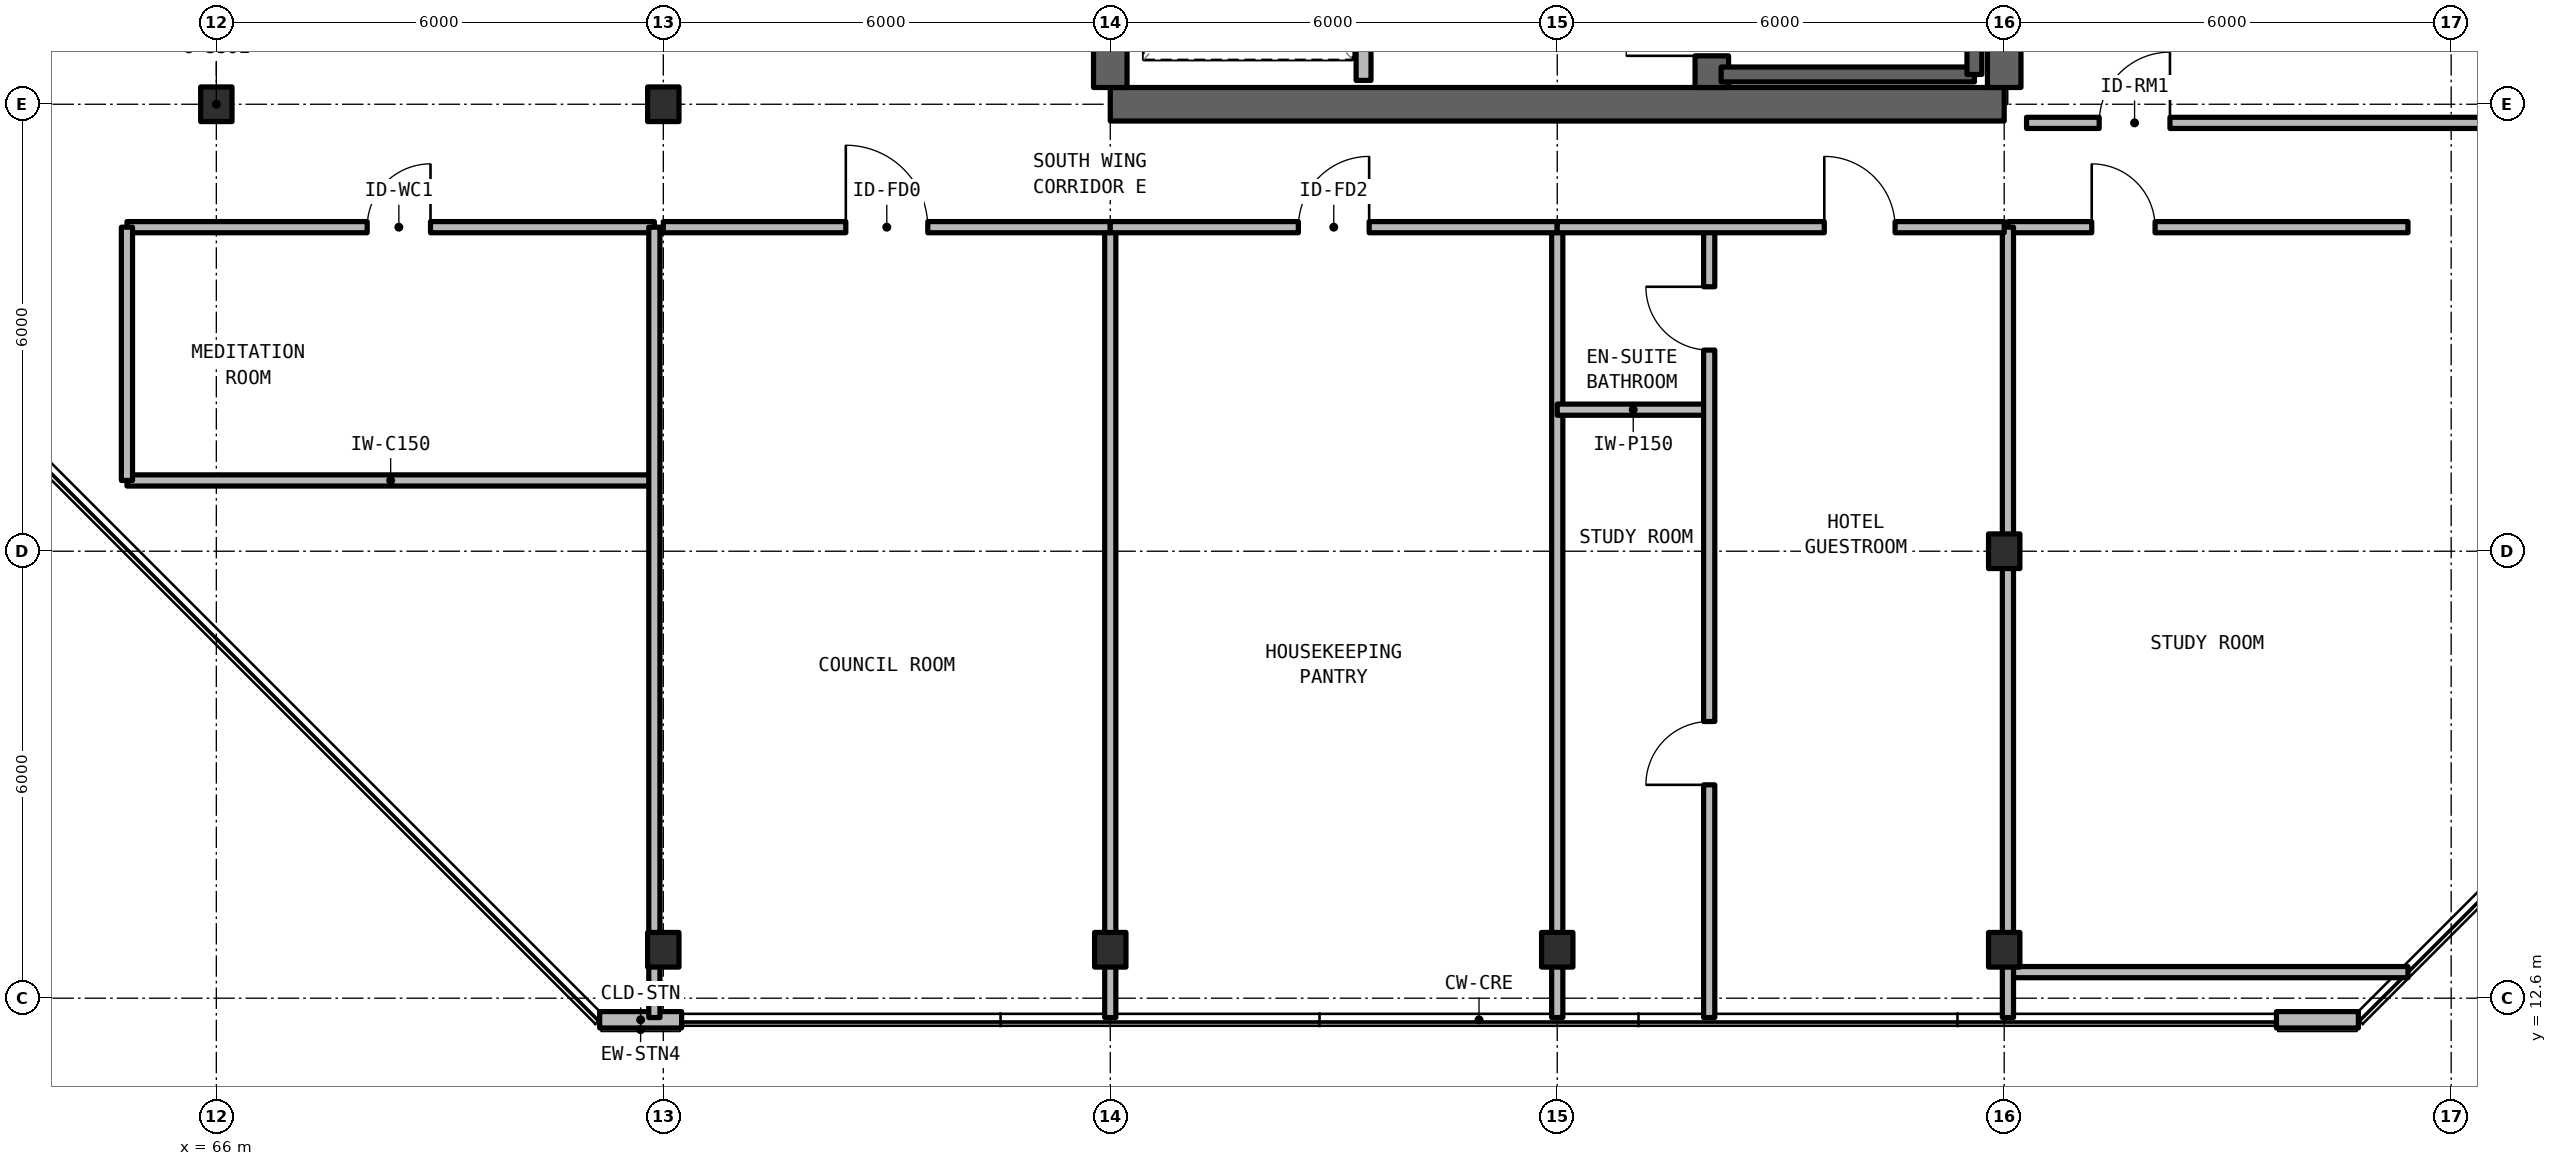
"""IFC4 building model, lengths in metres.
Left out: names, types, materials, properties, quantities, classifications, styles, units other than length and angle.
Written with IfcOpenShell. Run it as: python <this file> out.ifc"""

import sys

from ifc_helpers import new_model, si_unit, direction, frame, frame_2d, origin, origin_2d, place, context, subcontext, project, spatial, rectangle, i_section, extrude, element, fill, save


model = new_model("IFC4")
c1 = context("Model", 3, precision=1e-05, world=origin(), true_north=direction((0.0, 1.0)))
c2 = subcontext(c1, "Body", "Model", "MODEL_VIEW")
j1 = project(units=[si_unit("LENGTHUNIT", "METRE"), si_unit("PLANEANGLEUNIT", "RADIAN")], contexts=[c1])
p1 = place(None, origin())
s1 = spatial("IfcSite", under=j1, at=p1, CompositionType="ELEMENT")
p2 = place(p1, origin())
s2 = spatial("IfcBuilding", under=s1, at=p2, CompositionType="ELEMENT")
p3 = place(p2, frame((0.0, 0.0, 267.96)))
s3 = spatial("IfcBuildingStorey", under=s2, at=p3, CompositionType="ELEMENT", Elevation=267.96)
p4 = place(p3, frame((78.0, 24.6, 0.0), z_axis=(0.0, 0.0, 1.0), x_axis=(1.0, 0.0, 0.0)))
e1 = element("IfcWall", 1, at=p4, inside=s3, PredefinedType="SHEAR", context=c2, shape_type="SweptSolid", body=[
    extrude(rectangle(XDim=12.0, YDim=0.45, at=frame_2d((6.0, 0.0))), origin(), (0.0, 0.0, 1.0), 3.63),
])
p5 = place(p3, frame((90.0, 24.825, 0.0), z_axis=(0.0, 0.0, 1.0), x_axis=(0.0, 1.0, 0.0)))
e2 = element("IfcWall", 2, at=p5, inside=s3, PredefinedType="SHEAR", context=c2, shape_type="SweptSolid", body=[
    extrude(rectangle(XDim=17.55, YDim=0.45, at=frame_2d((8.775, 0.0))), origin(), (0.0, 0.0, 1.0), 3.63),
])
p6 = place(p3, frame((78.0, 24.825, 0.0), z_axis=(0.0, 0.0, 1.0), x_axis=(0.0, 1.0, 0.0)))
e3 = element("IfcWall", 3, at=p6, inside=s3, PredefinedType="SHEAR", context=c2, shape_type="SweptSolid", body=[
    extrude(rectangle(XDim=8.975, YDim=0.45, at=frame_2d((4.488, 0.0))), origin(), (0.0, 0.0, 1.0), 3.63),
])
p7 = place(p3, frame((86.075, 24.825, 0.0), z_axis=(0.0, 0.0, 1.0), x_axis=(0.0, 1.0, 0.0)))
e4 = element("IfcWall", 4, at=p7, inside=s3, PredefinedType="SHEAR", context=c2, shape_type="SweptSolid", body=[
    extrude(rectangle(XDim=17.55, YDim=0.45, at=frame_2d((8.775, 0.0))), origin(), (0.0, 0.0, 1.0), 3.63),
])
p8 = place(p7, frame((0.425, 0.0, 0.0)))
e5 = element("IfcOpeningElement", 5, at=p8, cuts=e4, PredefinedType="OPENING", context=c2, shape_type="SweptSolid", body=[
    extrude(rectangle(XDim=1.15, YDim=2.15, at=frame_2d((0.575, 1.075))), frame((0.0, 0.235, 0.0), z_axis=(0.0, -1.0, 0.0), x_axis=(1.0, 0.0, 0.0)), (0.0, 0.0, 1.0), 0.47),
])
p9 = place(p7, frame((9.625, 0.0, 0.0)))
e6 = element("IfcOpeningElement", 6, at=p9, cuts=e4, PredefinedType="OPENING", context=c2, shape_type="SweptSolid", body=[
    extrude(rectangle(XDim=1.15, YDim=2.15, at=frame_2d((0.575, 1.075))), frame((0.0, 0.235, 0.0), z_axis=(0.0, -1.0, 0.0), x_axis=(1.0, 0.0, 0.0)), (0.0, 0.0, 1.0), 0.47),
])
for number, where, z_axis, x_axis in (
    (7, (66.0, 24.6, 0.0), (0.0, 0.0, 1.0), (1.0, 0.0, 0.0)),
    (8, (72.0, 24.6, 0.0), (0.0, 0.0, 1.0), (1.0, 0.0, 0.0)),
    (9, (90.0, 18.6, 0.0), (0.0, 0.0, 1.0), (1.0, 0.0, 0.0)),
    (10, (72.0, 13.25, 0.0), (0.0, 0.0, 1.0), (1.0, 0.0, 0.0)),
    (11, (78.0, 13.25, 0.0), (0.0, 0.0, 1.0), (1.0, 0.0, 0.0)),
    (12, (84.0, 13.25, 0.0), (0.0, 0.0, 1.0), (1.0, 0.0, 0.0)),
    (13, (90.0, 13.25, 0.0), (0.0, 0.0, 1.0), (1.0, 0.0, 0.0)),
):
    element("IfcColumn", number, at=place(p3, frame(where, z_axis=z_axis, x_axis=x_axis)), inside=s3, PredefinedType="COLUMN", context=c2, shape_type="SweptSolid", body=[
        extrude(i_section(OverallWidth=0.421, OverallDepth=0.465, WebThickness=0.045, FlangeThickness=0.07, FilletRadius=0.015, at=origin_2d()), origin(), (0.0, 0.0, 1.0), 3.63),
    ])
for number, where, z_axis, x_axis in (
    (14, (71.146, 12.31, 0.0), (0.0, 0.0, 1.0), (1.0, 0.0, 0.0)),
    (15, (93.654, 12.31, 0.0), (0.0, 0.0, 1.0), (1.0, 0.0, 0.0)),
):
    element("IfcWall", number, at=place(p3, frame(where, z_axis=z_axis, x_axis=x_axis)), inside=s3, PredefinedType="SOLIDWALL", context=c2, shape_type="SweptSolid", body=[
        extrude(rectangle(XDim=1.1, YDim=0.22, at=frame_2d((0.55, 0.0))), origin(), (0.0, 0.0, 1.0), 3.41),
    ])
p10 = place(p3, frame((81.4, 24.92, 0.0), z_axis=(0.0, 0.0, 1.0), x_axis=(0.0, 1.0, 0.0)))
e16 = element("IfcWall", 16, at=p10, inside=s3, PredefinedType="SOLIDWALL", context=c2, shape_type="SweptSolid", body=[
    extrude(rectangle(XDim=3.58, YDim=0.2, at=frame_2d((1.79, 0.0))), origin(), (0.0, 0.0, 1.0), 2.63),
])
p11 = place(p10, frame((1.3, 0.0, 0.0)))
e17 = element("IfcOpeningElement", 17, at=p11, cuts=e16, PredefinedType="OPENING", context=c2, shape_type="SweptSolid", body=[
    extrude(rectangle(XDim=1.1, YDim=2.2, at=frame_2d((0.55, 1.1))), frame((0.0, 0.11, 0.0), z_axis=(0.0, -1.0, 0.0), x_axis=(1.0, 0.0, 0.0)), (0.0, 0.0, 1.0), 0.22),
])
p12 = place(p3, frame((64.8, 19.55, 0.0), z_axis=(0.0, 0.0, 1.0), x_axis=(1.0, 0.0, 0.0)))
e18 = element("IfcWall", 18, at=p12, inside=s3, PredefinedType="SOLIDWALL", context=c2, shape_type="SweptSolid", body=[
    extrude(rectangle(XDim=7.08, YDim=0.15, at=frame_2d((3.54, 0.0))), origin(), (0.0, 0.0, 1.0), 2.63),
])
p13 = place(p3, frame((64.8, 22.95, 0.0), z_axis=(0.0, 0.0, 1.0), x_axis=(1.0, 0.0, 0.0)))
e19 = element("IfcWall", 19, at=p13, inside=s3, PredefinedType="SOLIDWALL", context=c2, shape_type="SweptSolid", body=[
    extrude(rectangle(XDim=7.08, YDim=0.15, at=frame_2d((3.54, 0.0))), origin(), (0.0, 0.0, 1.0), 2.63),
])
p14 = place(p13, frame((3.225, 0.0, 0.0)))
e20 = element("IfcOpeningElement", 20, at=p14, cuts=e19, PredefinedType="OPENING", context=c2, shape_type="SweptSolid", body=[
    extrude(rectangle(XDim=0.85, YDim=2.1, at=frame_2d((0.425, 1.05))), frame((0.0, 0.085, 0.0), z_axis=(0.0, -1.0, 0.0), x_axis=(1.0, 0.0, 0.0)), (0.0, 0.0, 1.0), 0.17),
])
p15 = place(p3, frame((64.8, 19.55, 0.0), z_axis=(0.0, 0.0, 1.0), x_axis=(0.0, 1.0, 0.0)))
e21 = element("IfcWall", 21, at=p15, inside=s3, PredefinedType="SOLIDWALL", context=c2, shape_type="SweptSolid", body=[
    extrude(rectangle(XDim=3.4, YDim=0.15, at=frame_2d((1.7, 0.0))), origin(), (0.0, 0.0, 1.0), 2.63),
])
p16 = place(p3, frame((71.88, 12.34, 0.0), z_axis=(0.0, 0.0, 1.0), x_axis=(0.0, 1.0, 0.0)))
e22 = element("IfcWall", 22, at=p16, inside=s3, PredefinedType="SOLIDWALL", context=c2, shape_type="SweptSolid", body=[
    extrude(rectangle(XDim=10.61, YDim=0.15, at=frame_2d((5.305, 0.0))), origin(), (0.0, 0.0, 1.0), 2.63),
])
p17 = place(p3, frame((90.3, 24.35, 0.0), z_axis=(0.0, 0.0, 1.0), x_axis=(1.0, 0.0, 0.0)))
e23 = element("IfcWall", 23, at=p17, inside=s3, PredefinedType="SOLIDWALL", context=c2, shape_type="SweptSolid", body=[
    extrude(rectangle(XDim=8.52, YDim=0.15, at=frame_2d((4.26, 0.0))), origin(), (0.0, 0.0, 1.0), 2.63),
])
p18 = place(p17, frame((0.975, 0.0, 0.0)))
e24 = element("IfcOpeningElement", 24, at=p18, cuts=e23, PredefinedType="OPENING", context=c2, shape_type="SweptSolid", body=[
    extrude(rectangle(XDim=0.95, YDim=2.15, at=frame_2d((0.475, 1.075))), frame((0.0, 0.085, 0.0), z_axis=(0.0, -1.0, 0.0), x_axis=(1.0, 0.0, 0.0)), (0.0, 0.0, 1.0), 0.17),
])
p19 = place(p3, frame((90.05, 12.95, 0.0), z_axis=(0.0, 0.0, 1.0), x_axis=(1.0, 0.0, 0.0)))
e25 = element("IfcWall", 25, at=p19, inside=s3, PredefinedType="SOLIDWALL", context=c2, shape_type="SweptSolid", body=[
    extrude(rectangle(XDim=5.37, YDim=0.15, at=frame_2d((2.685, 0.0))), origin(), (0.0, 0.0, 1.0), 2.63),
])
p20 = place(p3, frame((90.05, 22.95, 0.0), z_axis=(0.0, 0.0, 1.0), x_axis=(1.0, 0.0, 0.0)))
e26 = element("IfcWall", 26, at=p20, inside=s3, PredefinedType="SOLIDWALL", context=c2, shape_type="SweptSolid", body=[
    extrude(rectangle(XDim=5.37, YDim=0.15, at=frame_2d((2.685, 0.0))), origin(), (0.0, 0.0, 1.0), 2.63),
])
p21 = place(p20, frame((1.125, 0.0, 0.0)))
e27 = element("IfcOpeningElement", 27, at=p21, cuts=e26, PredefinedType="OPENING", context=c2, shape_type="SweptSolid", body=[
    extrude(rectangle(XDim=0.85, YDim=2.1, at=frame_2d((0.425, 1.05))), frame((0.0, 0.085, 0.0), z_axis=(0.0, -1.0, 0.0), x_axis=(1.0, 0.0, 0.0)), (0.0, 0.0, 1.0), 0.17),
])
for number, where, z_axis, x_axis in (
    (28, (90.05, 12.34, 0.0), (0.0, 0.0, 1.0), (0.0, 1.0, 0.0)),
    (29, (78.0, 12.34, 0.0), (0.0, 0.0, 1.0), (0.0, 1.0, 0.0)),
):
    element("IfcWall", number, at=place(p3, frame(where, z_axis=z_axis, x_axis=x_axis)), inside=s3, PredefinedType="SOLIDWALL", context=c2, shape_type="SweptSolid", body=[
        extrude(rectangle(XDim=10.61, YDim=0.15, at=frame_2d((5.305, 0.0))), origin(), (0.0, 0.0, 1.0), 2.63),
    ])
p22 = place(p3, frame((72.0, 22.95, 0.0), z_axis=(0.0, 0.0, 1.0), x_axis=(1.0, 0.0, 0.0)))
e30 = element("IfcWall", 30, at=p22, inside=s3, PredefinedType="SOLIDWALL", context=c2, shape_type="SweptSolid", body=[
    extrude(rectangle(XDim=6.0, YDim=0.15, at=frame_2d((3.0, 0.0))), origin(), (0.0, 0.0, 1.0), 2.63),
])
p23 = place(p22, frame((2.45, 0.0, 0.0)))
e31 = element("IfcOpeningElement", 31, at=p23, cuts=e30, PredefinedType="OPENING", context=c2, shape_type="SweptSolid", body=[
    extrude(rectangle(XDim=1.1, YDim=2.15, at=frame_2d((0.55, 1.075))), frame((0.0, 0.085, 0.0), z_axis=(0.0, -1.0, 0.0), x_axis=(1.0, 0.0, 0.0)), (0.0, 0.0, 1.0), 0.17),
])
p24 = place(p3, frame((84.0, 12.34, 0.0), z_axis=(0.0, 0.0, 1.0), x_axis=(0.0, 1.0, 0.0)))
e32 = element("IfcWall", 32, at=p24, inside=s3, PredefinedType="SOLIDWALL", context=c2, shape_type="SweptSolid", body=[
    extrude(rectangle(XDim=10.61, YDim=0.15, at=frame_2d((5.305, 0.0))), origin(), (0.0, 0.0, 1.0), 2.63),
])
p25 = place(p3, frame((78.0, 22.95, 0.0), z_axis=(0.0, 0.0, 1.0), x_axis=(1.0, 0.0, 0.0)))
e33 = element("IfcWall", 33, at=p25, inside=s3, PredefinedType="SOLIDWALL", context=c2, shape_type="SweptSolid", body=[
    extrude(rectangle(XDim=6.0, YDim=0.15, at=frame_2d((3.0, 0.0))), origin(), (0.0, 0.0, 1.0), 2.63),
])
p26 = place(p25, frame((2.525, 0.0, 0.0)))
e34 = element("IfcOpeningElement", 34, at=p26, cuts=e33, PredefinedType="OPENING", context=c2, shape_type="SweptSolid", body=[
    extrude(rectangle(XDim=0.95, YDim=2.15, at=frame_2d((0.475, 1.075))), frame((0.0, 0.085, 0.0), z_axis=(0.0, -1.0, 0.0), x_axis=(1.0, 0.0, 0.0)), (0.0, 0.0, 1.0), 0.17),
])
p27 = place(p3, frame((84.0, 20.5, 0.0), z_axis=(0.0, 0.0, 1.0), x_axis=(1.0, 0.0, 0.0)))
e35 = element("IfcWall", 35, at=p27, inside=s3, PredefinedType="PARTITIONING", context=c2, shape_type="SweptSolid", body=[
    extrude(rectangle(XDim=2.04, YDim=0.15, at=frame_2d((1.02, 0.0))), origin(), (0.0, 0.0, 1.0), 2.63),
])
p28 = place(p3, frame((86.04, 12.34, 0.0), z_axis=(0.0, 0.0, 1.0), x_axis=(0.0, 1.0, 0.0)))
e36 = element("IfcWall", 36, at=p28, inside=s3, PredefinedType="PARTITIONING", context=c2, shape_type="SweptSolid", body=[
    extrude(rectangle(XDim=10.61, YDim=0.15, at=frame_2d((5.305, 0.0))), origin(), (0.0, 0.0, 1.0), 2.63),
])
p29 = place(p28, frame((3.124, 0.0, 0.0)))
e37 = element("IfcOpeningElement", 37, at=p29, cuts=e36, PredefinedType="OPENING", context=c2, shape_type="SweptSolid", body=[
    extrude(rectangle(XDim=0.85, YDim=2.1, at=frame_2d((0.425, 1.05))), frame((0.0, 0.085, 0.0), z_axis=(0.0, -1.0, 0.0), x_axis=(1.0, 0.0, 0.0)), (0.0, 0.0, 1.0), 0.17),
])
p30 = place(p28, frame((8.96, 0.0, 0.0)))
e38 = element("IfcOpeningElement", 38, at=p30, cuts=e36, PredefinedType="OPENING", context=c2, shape_type="SweptSolid", body=[
    extrude(rectangle(XDim=0.85, YDim=2.1, at=frame_2d((0.425, 1.05))), frame((0.0, 0.085, 0.0), z_axis=(0.0, -1.0, 0.0), x_axis=(1.0, 0.0, 0.0)), (0.0, 0.0, 1.0), 0.17),
])
p31 = place(p3, frame((84.0, 22.95, 0.0), z_axis=(0.0, 0.0, 1.0), x_axis=(1.0, 0.0, 0.0)))
e39 = element("IfcWall", 39, at=p31, inside=s3, PredefinedType="SOLIDWALL", context=c2, shape_type="SweptSolid", body=[
    extrude(rectangle(XDim=6.0, YDim=0.15, at=frame_2d((3.0, 0.0))), origin(), (0.0, 0.0, 1.0), 2.63),
])
p32 = place(p31, frame((3.585, 0.0, 0.0)))
e40 = element("IfcOpeningElement", 40, at=p32, cuts=e39, PredefinedType="OPENING", context=c2, shape_type="SweptSolid", body=[
    extrude(rectangle(XDim=0.95, YDim=2.15, at=frame_2d((0.475, 1.075))), frame((0.0, 0.085, 0.0), z_axis=(0.0, -1.0, 0.0), x_axis=(1.0, 0.0, 0.0)), (0.0, 0.0, 1.0), 0.17),
])
p33 = place(p3, frame((86.2, 25.0, 0.0), z_axis=(0.0, 0.0, 1.0), x_axis=(1.0, 0.0, 0.0)))
e41 = element("IfcWall", 41, at=p33, inside=s3, PredefinedType="SOLIDWALL", context=c2, shape_type="SweptSolid", body=[
    extrude(rectangle(XDim=3.4, YDim=0.2, at=frame_2d((1.7, 0.0))), origin(), (0.0, 0.0, 1.0), 3.63),
])
p34 = place(p3, frame((89.6, 25.0, 0.0), z_axis=(0.0, 0.0, 1.0), x_axis=(0.0, 1.0, 0.0)))
e42 = element("IfcWall", 42, at=p34, inside=s3, PredefinedType="SOLIDWALL", context=c2, shape_type="SweptSolid", body=[
    extrude(rectangle(XDim=8.0, YDim=0.2, at=frame_2d((4.0, 0.0))), origin(), (0.0, 0.0, 1.0), 3.63),
])
p35 = place(p14, origin())
e43 = element("IfcDoor", 43, at=p35, inside=s3, OperationType="SINGLE_SWING_RIGHT", PredefinedType="DOOR", context=c2, shape_type="SweptSolid", body=[
    extrude(rectangle(XDim=0.85, YDim=2.1, at=frame_2d((0.425, 1.05))), frame((0.0, 0.025, 0.0), z_axis=(0.0, -1.0, 0.0), x_axis=(1.0, 0.0, 0.0)), (0.0, 0.0, 1.0), 0.05),
])
fill(e20, e43)
p36 = place(p18, origin())
e44 = element("IfcDoor", 44, at=p36, inside=s3, OperationType="SINGLE_SWING_RIGHT", PredefinedType="DOOR", context=c2, shape_type="SweptSolid", body=[
    extrude(rectangle(XDim=0.95, YDim=2.15, at=frame_2d((0.475, 1.075))), frame((0.0, 0.025, 0.0), z_axis=(0.0, -1.0, 0.0), x_axis=(1.0, 0.0, 0.0)), (0.0, 0.0, 1.0), 0.05),
])
fill(e24, e44)
p37 = place(p21, origin())
e45 = element("IfcDoor", 45, at=p37, inside=s3, OperationType="SINGLE_SWING_LEFT", PredefinedType="DOOR", context=c2, shape_type="SweptSolid", body=[
    extrude(rectangle(XDim=0.85, YDim=2.1, at=frame_2d((0.425, 1.05))), frame((0.0, 0.025, 0.0), z_axis=(0.0, -1.0, 0.0), x_axis=(1.0, 0.0, 0.0)), (0.0, 0.0, 1.0), 0.05),
])
fill(e27, e45)
p38 = place(p23, origin())
e46 = element("IfcDoor", 46, at=p38, inside=s3, OperationType="SINGLE_SWING_LEFT", PredefinedType="DOOR", context=c2, shape_type="SweptSolid", body=[
    extrude(rectangle(XDim=1.1, YDim=2.15, at=frame_2d((0.55, 1.075))), frame((0.0, 0.025, 0.0), z_axis=(0.0, -1.0, 0.0), x_axis=(1.0, 0.0, 0.0)), (0.0, 0.0, 1.0), 0.05),
])
fill(e31, e46)
p39 = place(p26, origin())
e47 = element("IfcDoor", 47, at=p39, inside=s3, OperationType="SINGLE_SWING_RIGHT", PredefinedType="DOOR", context=c2, shape_type="SweptSolid", body=[
    extrude(rectangle(XDim=0.95, YDim=2.15, at=frame_2d((0.475, 1.075))), frame((0.0, 0.025, 0.0), z_axis=(0.0, -1.0, 0.0), x_axis=(1.0, 0.0, 0.0)), (0.0, 0.0, 1.0), 0.05),
])
fill(e34, e47)
p40 = place(p29, origin())
e48 = element("IfcDoor", 48, at=p40, inside=s3, OperationType="SINGLE_SWING_LEFT", PredefinedType="DOOR", context=c2, shape_type="SweptSolid", body=[
    extrude(rectangle(XDim=0.85, YDim=2.1, at=frame_2d((0.425, 1.05))), frame((0.0, 0.025, 0.0), z_axis=(0.0, -1.0, 0.0), x_axis=(1.0, 0.0, 0.0)), (0.0, 0.0, 1.0), 0.05),
])
fill(e37, e48)
p41 = place(p30, origin())
e49 = element("IfcDoor", 49, at=p41, inside=s3, OperationType="SINGLE_SWING_RIGHT", PredefinedType="DOOR", context=c2, shape_type="SweptSolid", body=[
    extrude(rectangle(XDim=0.85, YDim=2.1, at=frame_2d((0.425, 1.05))), frame((0.0, 0.025, 0.0), z_axis=(0.0, -1.0, 0.0), x_axis=(1.0, 0.0, 0.0)), (0.0, 0.0, 1.0), 0.05),
])
fill(e38, e49)
p42 = place(p32, origin())
e50 = element("IfcDoor", 50, at=p42, inside=s3, OperationType="SINGLE_SWING_LEFT", PredefinedType="DOOR", context=c2, shape_type="SweptSolid", body=[
    extrude(rectangle(XDim=0.95, YDim=2.15, at=frame_2d((0.475, 1.075))), frame((0.0, 0.025, 0.0), z_axis=(0.0, -1.0, 0.0), x_axis=(1.0, 0.0, 0.0)), (0.0, 0.0, 1.0), 0.05),
])
fill(e40, e50)
p43 = place(p8, origin())
e51 = element("IfcDoor", 51, at=p43, inside=s3, OperationType="SINGLE_SWING_LEFT", PredefinedType="DOOR", context=c2, shape_type="SweptSolid", body=[
    extrude(rectangle(XDim=1.15, YDim=2.15, at=frame_2d((0.575, 1.075))), frame((0.0, 0.025, 0.0), z_axis=(0.0, -1.0, 0.0), x_axis=(1.0, 0.0, 0.0)), (0.0, 0.0, 1.0), 0.05),
])
fill(e5, e51)
save(model, sys.argv[1])
